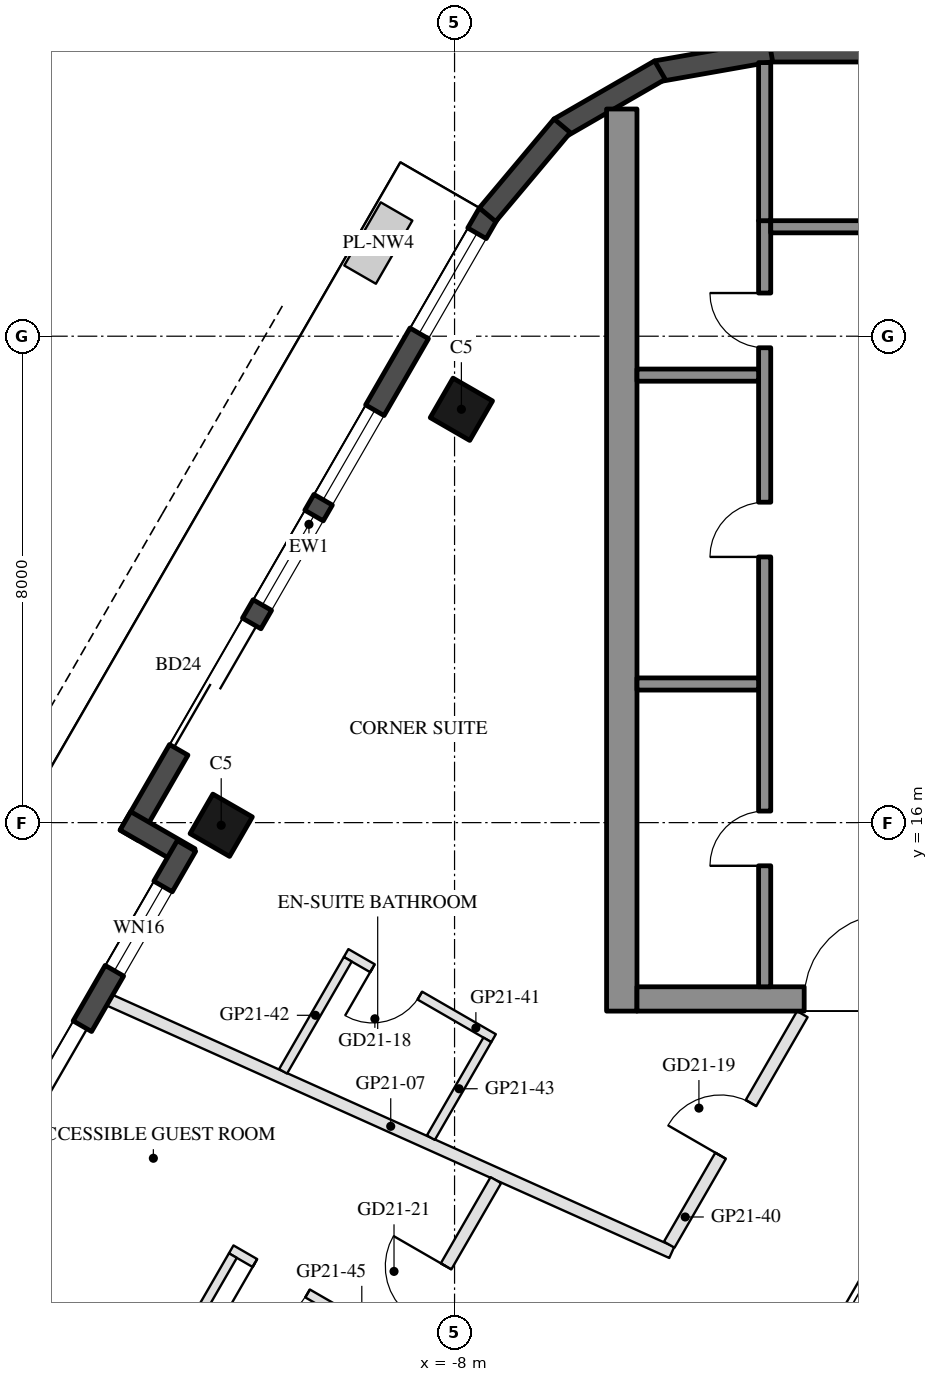
"""IFC4 building model, lengths in metres.
Left out: names, types, materials, properties, quantities, classifications, styles, units other than length and angle.
Written with IfcOpenShell. Run it as: python <this file> out.ifc"""

import sys

from ifc_helpers import new_model, si_unit, direction, frame, frame_2d, origin, origin_2d, place, context, subcontext, project, spatial, rectangle, hollow_rectangle, extrude, element, fill, save


model = new_model("IFC4")
c1 = context("Model", 3, precision=1e-05, world=origin(), true_north=direction((0.0, 1.0)))
c2 = subcontext(c1, "Body", "Model", "MODEL_VIEW")
j1 = project(units=[si_unit("LENGTHUNIT", "METRE"), si_unit("PLANEANGLEUNIT", "RADIAN")], contexts=[c1])
p1 = place(None, origin())
s1 = spatial("IfcSite", under=j1, at=p1, CompositionType="ELEMENT")
p2 = place(p1, origin())
s2 = spatial("IfcBuilding", under=s1, at=p2, CompositionType="ELEMENT")
p3 = place(p2, frame((0.0, 0.0, 216.9)))
s3 = spatial("IfcBuildingStorey", under=s2, at=p3, CompositionType="ELEMENT", Elevation=216.9)
for number, where, z_axis, x_axis in (
    (1, (-7.888, 22.798, 0.0), (0.0, 0.0, 1.0), (0.5, 0.866, 0.0)),
    (2, (-11.838, 15.957, 0.0), (0.0, 0.0, 1.0), (0.5, 0.866, 0.0)),
):
    element("IfcColumn", number, at=place(p3, frame(where, z_axis=z_axis, x_axis=x_axis)), inside=s3, PredefinedType="COLUMN", context=c2, shape_type="SweptSolid", body=[
        extrude(hollow_rectangle(XDim=0.75, YDim=0.75, WallThickness=0.035, at=origin_2d()), origin(), (0.0, 0.0, 1.0), 3.7),
    ])
p4 = place(p3, frame((-7.441, 26.022, 0.0), z_axis=(0.0, 0.0, 1.0), x_axis=(-0.499992533062, -0.86602971478, 0.0)))
e3 = element("IfcWall", 3, at=p4, inside=s3, PredefinedType="SOLIDWALL", context=c2, shape_type="SweptSolid", body=[
    extrude(rectangle(XDim=11.816, YDim=0.35, at=frame_2d((5.908, 0.0))), origin(), (0.0, 0.0, 1.0), 3.55),
])
p5 = place(p4, frame((0.381, 0.0, 0.3)))
e4 = element("IfcOpeningElement", 4, at=p5, cuts=e3, PredefinedType="OPENING", context=c2, shape_type="SweptSolid", body=[
    extrude(rectangle(XDim=1.9, YDim=2.65, at=frame_2d((0.95, 1.325))), frame((0.0, 0.185, 0.0), z_axis=(0.0, -1.0, 0.0), x_axis=(1.0, 0.0, 0.0)), (0.0, 0.0, 1.0), 0.37),
])
p6 = place(p4, frame((7.791, 0.0, 0.0)))
e5 = element("IfcOpeningElement", 5, at=p6, cuts=e3, PredefinedType="OPENING", context=c2, shape_type="SweptSolid", body=[
    extrude(rectangle(XDim=2.4, YDim=2.4, at=frame_2d((1.2, 1.2))), frame((0.0, 0.185, 0.0), z_axis=(0.0, -1.0, 0.0), x_axis=(1.0, 0.0, 0.0)), (0.0, 0.0, 1.0), 0.37),
])
p7 = place(p4, frame((3.741, 0.0, 0.3)))
e6 = element("IfcOpeningElement", 6, at=p7, cuts=e3, PredefinedType="OPENING", context=c2, shape_type="SweptSolid", body=[
    extrude(rectangle(XDim=1.7, YDim=2.65, at=frame_2d((0.85, 1.325))), frame((0.0, 0.185, 0.0), z_axis=(0.0, -1.0, 0.0), x_axis=(1.0, 0.0, 0.0)), (0.0, 0.0, 1.0), 0.37),
])
p8 = place(p4, frame((5.741, 0.0, 0.3)))
e7 = element("IfcOpeningElement", 7, at=p8, cuts=e3, PredefinedType="OPENING", context=c2, shape_type="SweptSolid", body=[
    extrude(rectangle(XDim=1.7, YDim=2.65, at=frame_2d((0.85, 1.325))), frame((0.0, 0.185, 0.0), z_axis=(0.0, -1.0, 0.0), x_axis=(1.0, 0.0, 0.0)), (0.0, 0.0, 1.0), 0.37),
])
p9 = place(p3, frame((-13.413, 16.029, 0.0), z_axis=(0.0, 0.0, 1.0), x_axis=(0.866005645448, -0.500034220881, 0.0)))
e8 = element("IfcWall", 8, at=p9, inside=s3, PredefinedType="SOLIDWALL", context=c2, shape_type="SweptSolid", body=[
    extrude(rectangle(XDim=1.22, YDim=0.35, at=frame_2d((0.61, 0.0))), origin(), (0.0, 0.0, 1.0), 3.55),
])
p10 = place(p3, frame((-12.409, 15.617, 0.0), z_axis=(0.0, 0.0, 1.0), x_axis=(-0.500003597184, -0.866023326939, 0.0)))
e9 = element("IfcWall", 9, at=p10, inside=s3, PredefinedType="SOLIDWALL", context=c2, shape_type="SweptSolid", body=[
    extrude(rectangle(XDim=6.74, YDim=0.35, at=frame_2d((3.37, 0.0))), origin(), (0.0, 0.0, 1.0), 3.55),
])
p11 = place(p10, frame((0.77, 0.0, 0.3)))
e10 = element("IfcOpeningElement", 10, at=p11, cuts=e9, PredefinedType="OPENING", context=c2, shape_type="SweptSolid", body=[
    extrude(rectangle(XDim=1.6, YDim=2.65, at=frame_2d((0.8, 1.325))), frame((0.0, 0.185, 0.0), z_axis=(0.0, -1.0, 0.0), x_axis=(1.0, 0.0, 0.0)), (0.0, 0.0, 1.0), 0.37),
])
p12 = place(p10, frame((3.424, 0.0, 0.0)))
e11 = element("IfcOpeningElement", 11, at=p12, cuts=e9, PredefinedType="OPENING", context=c2, shape_type="SweptSolid", body=[
    extrude(rectangle(XDim=2.4, YDim=2.4, at=frame_2d((1.2, 1.2))), frame((0.0, 0.185, 0.0), z_axis=(0.0, -1.0, 0.0), x_axis=(1.0, 0.0, 0.0)), (0.0, 0.0, 1.0), 0.37),
])
p13 = place(p3, frame((2.829, 28.685, 0.0), z_axis=(0.0, 0.0, 1.0), x_axis=(-1.0, 0.0, 0.0)))
e12 = element("IfcWall", 12, at=p13, inside=s3, PredefinedType="SOLIDWALL", context=c2, shape_type="SweptSolid", body=[
    extrude(rectangle(XDim=5.658, YDim=0.35, at=frame_2d((2.829, 0.0))), origin(), (0.0, 0.0, 1.0), 3.55),
])
for number, where, z_axis, x_axis in (
    (13, (-2.799, 28.688, 0.0), (0.0, 0.0, 1.0), (-0.985, -0.174, 0.0)),
    (14, (-4.623, 28.377, 0.0), (0.0, 0.0, 1.0), (-0.866, -0.5, 0.0)),
):
    element("IfcWall", number, at=place(p3, frame(where, z_axis=z_axis, x_axis=x_axis)), inside=s3, PredefinedType="SOLIDWALL", context=c2, shape_type="SweptSolid", body=[
        extrude(rectangle(XDim=1.91, YDim=0.35, at=frame_2d((0.955, 0.0))), origin(), (0.0, 0.0, 1.0), 3.55),
    ])
p14 = place(p3, frame((-6.23, 27.461, 0.0), z_axis=(0.0, 0.0, 1.0), x_axis=(-0.642808304945, -0.766027077259, 0.0)))
e15 = element("IfcWall", 15, at=p14, inside=s3, PredefinedType="SOLIDWALL", context=c2, shape_type="SweptSolid", body=[
    extrude(rectangle(XDim=1.91, YDim=0.35, at=frame_2d((0.955, 0.0))), origin(), (0.0, 0.0, 1.0), 3.55),
])
p15 = place(p3, frame((-5.25, 12.9, 0.0), z_axis=(0.0, 0.0, 1.0), x_axis=(0.0, 1.0, 0.0)))
e16 = element("IfcWall", 16, at=p15, inside=s3, PredefinedType="SHEAR", context=c2, shape_type="SweptSolid", body=[
    extrude(rectangle(XDim=14.837, YDim=0.5, at=frame_2d((7.418, 0.0))), origin(), (0.0, 0.0, 1.0), 3.5),
])
p16 = place(p3, frame((5.0, 13.1, 0.0), z_axis=(0.0, 0.0, 1.0), x_axis=(-1.0, 0.0, 0.0)))
e17 = element("IfcWall", 17, at=p16, inside=s3, PredefinedType="SHEAR", context=c2, shape_type="SweptSolid", body=[
    extrude(rectangle(XDim=10.0, YDim=0.4, at=frame_2d((5.0, 0.0))), origin(), (0.0, 0.0, 1.0), 3.5),
])
p17 = place(p16, frame((3.55, 0.0, 0.0)))
e18 = element("IfcOpeningElement", 18, at=p17, cuts=e17, PredefinedType="OPENING", context=c2, shape_type="SweptSolid", body=[
    extrude(rectangle(XDim=1.1, YDim=2.1, at=frame_2d((0.55, 1.05))), frame((0.0, 0.21, 0.0), z_axis=(0.0, -1.0, 0.0), x_axis=(1.0, 0.0, 0.0)), (0.0, 0.0, 1.0), 0.42),
])
p18 = place(p16, frame((5.85, 0.0, 0.0)))
e19 = element("IfcOpeningElement", 19, at=p18, cuts=e17, PredefinedType="OPENING", context=c2, shape_type="SweptSolid", body=[
    extrude(rectangle(XDim=1.4, YDim=2.1, at=frame_2d((0.7, 1.05))), frame((0.0, 0.21, 0.0), z_axis=(0.0, -1.0, 0.0), x_axis=(1.0, 0.0, 0.0)), (0.0, 0.0, 1.0), 0.42),
])
p19 = place(p3, frame((-2.9, 13.3, 0.0), z_axis=(0.0, 0.0, 1.0), x_axis=(0.0, 1.0, 0.0)))
e20 = element("IfcWall", 20, at=p19, inside=s3, PredefinedType="SHEAR", context=c2, shape_type="SweptSolid", body=[
    extrude(rectangle(XDim=12.6, YDim=0.2, at=frame_2d((6.3, 0.0))), origin(), (0.0, 0.0, 1.0), 3.5),
])
p20 = place(p19, frame((1.99, 0.0, 0.0)))
e21 = element("IfcOpeningElement", 21, at=p20, cuts=e20, PredefinedType="OPENING", context=c2, shape_type="SweptSolid", body=[
    extrude(rectangle(XDim=0.9, YDim=2.1, at=frame_2d((0.45, 1.05))), frame((0.0, 0.11, 0.0), z_axis=(0.0, -1.0, 0.0), x_axis=(1.0, 0.0, 0.0)), (0.0, 0.0, 1.0), 0.22),
])
p21 = place(p19, frame((7.07, 0.0, 0.0)))
e22 = element("IfcOpeningElement", 22, at=p21, cuts=e20, PredefinedType="OPENING", context=c2, shape_type="SweptSolid", body=[
    extrude(rectangle(XDim=0.9, YDim=2.1, at=frame_2d((0.45, 1.05))), frame((0.0, 0.11, 0.0), z_axis=(0.0, -1.0, 0.0), x_axis=(1.0, 0.0, 0.0)), (0.0, 0.0, 1.0), 0.22),
])
p22 = place(p19, frame((10.51, 0.0, 0.0)))
e23 = element("IfcOpeningElement", 23, at=p22, cuts=e20, PredefinedType="OPENING", context=c2, shape_type="SweptSolid", body=[
    extrude(rectangle(XDim=0.9, YDim=2.1, at=frame_2d((0.45, 1.05))), frame((0.0, 0.11, 0.0), z_axis=(0.0, -1.0, 0.0), x_axis=(1.0, 0.0, 0.0)), (0.0, 0.0, 1.0), 0.22),
])
p23 = place(p3, frame((-0.4, 25.8, 0.0), z_axis=(0.0, 0.0, 1.0), x_axis=(-1.0, 0.0, 0.0)))
e24 = element("IfcWall", 24, at=p23, inside=s3, PredefinedType="SHEAR", context=c2, shape_type="SweptSolid", body=[
    extrude(rectangle(XDim=2.4, YDim=0.2, at=frame_2d((1.2, 0.0))), origin(), (0.0, 0.0, 1.0), 3.5),
])
for number, where, z_axis, x_axis in (
    (25, (-3.0, 18.28, 0.0), (0.0, 0.0, 1.0), (-1.0, 0.0, 0.0)),
    (26, (-3.0, 23.36, 0.0), (0.0, 0.0, 1.0), (-1.0, 0.0, 0.0)),
):
    element("IfcWall", number, at=place(p3, frame(where, z_axis=z_axis, x_axis=x_axis)), inside=s3, PredefinedType="SHEAR", context=c2, shape_type="SweptSolid", body=[
        extrude(rectangle(XDim=2.0, YDim=0.2, at=frame_2d((1.0, 0.0))), origin(), (0.0, 0.0, 1.0), 3.5),
    ])
p24 = place(p3, frame((-2.9, 25.9, 0.0), z_axis=(0.0, 0.0, 1.0), x_axis=(0.0, 1.0, 0.0)))
e27 = element("IfcWall", 27, at=p24, inside=s3, PredefinedType="SHEAR", context=c2, shape_type="SweptSolid", body=[
    extrude(rectangle(XDim=2.6, YDim=0.2, at=frame_2d((1.3, 0.0))), origin(), (0.0, 0.0, 1.0), 3.5),
])
p25 = place(p3, frame((-13.672, 13.08, 0.0), z_axis=(0.0, 0.0, 1.0), x_axis=(0.912311972773, -0.409495866077, 0.0)))
e28 = element("IfcWall", 28, at=p25, inside=s3, PredefinedType="PARTITIONING", context=c2, shape_type="SweptSolid", body=[
    extrude(rectangle(XDim=10.132, YDim=0.2, at=frame_2d((5.066, 0.0))), origin(), (0.0, 0.0, 1.0), 3.06),
])
p26 = place(p3, frame((-17.347, 8.514, 0.0), z_axis=(0.0, 0.0, 1.0), x_axis=(0.879604495132, -0.475705720109, 0.0)))
e29 = element("IfcWall", 29, at=p26, inside=s3, PredefinedType="PARTITIONING", context=c2, shape_type="SweptSolid", body=[
    extrude(rectangle(XDim=7.983, YDim=0.2, at=frame_2d((3.992, 0.0))), origin(), (0.0, 0.0, 1.0), 3.06),
])
p27 = place(p3, frame((-4.469, 9.059, 0.0), z_axis=(0.0, 0.0, 1.0), x_axis=(0.499996027077, 0.86602769754, 0.0)))
e30 = element("IfcWall", 30, at=p27, inside=s3, PredefinedType="PARTITIONING", context=c2, shape_type="SweptSolid", body=[
    extrude(rectangle(XDim=4.377, YDim=0.2, at=frame_2d((2.189, 0.0))), origin(), (0.0, 0.0, 1.0), 2.95),
])
p28 = place(p27, frame((1.689, 0.0, 0.0)))
e31 = element("IfcOpeningElement", 31, at=p28, cuts=e30, PredefinedType="OPENING", context=c2, shape_type="SweptSolid", body=[
    extrude(rectangle(XDim=1.0, YDim=2.1, at=frame_2d((0.5, 1.05))), frame((0.0, 0.11, 0.0), z_axis=(0.0, -1.0, 0.0), x_axis=(1.0, 0.0, 0.0)), (0.0, 0.0, 1.0), 0.22),
])
p29 = place(p3, frame((-7.358, 12.455, 0.0), z_axis=(0.0, 0.0, 1.0), x_axis=(-0.866034573852, 0.49998411664, 0.0)))
e32 = element("IfcWall", 32, at=p29, inside=s3, PredefinedType="PARTITIONING", context=c2, shape_type="SweptSolid", body=[
    extrude(rectangle(XDim=2.8, YDim=0.15, at=frame_2d((1.4, 0.0))), origin(), (0.0, 0.0, 1.0), 3.55),
])
p30 = place(p29, frame((1.4, 0.0, 0.0)))
e33 = element("IfcOpeningElement", 33, at=p30, cuts=e32, PredefinedType="OPENING", context=c2, shape_type="SweptSolid", body=[
    extrude(rectangle(XDim=0.9, YDim=2.1, at=frame_2d((0.45, 1.05))), frame((0.0, 0.085, 0.0), z_axis=(0.0, -1.0, 0.0), x_axis=(1.0, 0.0, 0.0)), (0.0, 0.0, 1.0), 0.17),
])
p31 = place(p3, frame((-9.756, 13.752, 0.0), z_axis=(0.0, 0.0, 1.0), x_axis=(-0.50001378257, -0.866017446268, 0.0)))
e34 = element("IfcWall", 34, at=p31, inside=s3, PredefinedType="PARTITIONING", context=c2, shape_type="SweptSolid", body=[
    extrude(rectangle(XDim=2.128, YDim=0.15, at=frame_2d((1.064, 0.0))), origin(), (0.0, 0.0, 1.0), 3.55),
])
p32 = place(p3, frame((-7.461, 12.427, 0.0), z_axis=(0.0, 0.0, 1.0), x_axis=(-0.500025795397, -0.866010510293, 0.0)))
e35 = element("IfcWall", 35, at=p32, inside=s3, PredefinedType="PARTITIONING", context=c2, shape_type="SweptSolid", body=[
    extrude(rectangle(XDim=1.858, YDim=0.15, at=frame_2d((0.929, 0.0))), origin(), (0.0, 0.0, 1.0), 3.55),
])
p33 = place(p3, frame((-10.363, 4.851, 0.0), z_axis=(0.0, 0.0, 1.0), x_axis=(0.50000147882, 0.866024549986, 0.0)))
e36 = element("IfcWall", 36, at=p33, inside=s3, PredefinedType="PARTITIONING", context=c2, shape_type="SweptSolid", body=[
    extrude(rectangle(XDim=6.084, YDim=0.2, at=frame_2d((3.042, 0.0))), origin(), (0.0, 0.0, 1.0), 2.95),
])
p34 = place(p33, frame((3.447, 0.0, 0.0)))
e37 = element("IfcOpeningElement", 37, at=p34, cuts=e36, PredefinedType="OPENING", context=c2, shape_type="SweptSolid", body=[
    extrude(rectangle(XDim=1.0, YDim=2.1, at=frame_2d((0.5, 1.05))), frame((0.0, 0.11, 0.0), z_axis=(0.0, -1.0, 0.0), x_axis=(1.0, 0.0, 0.0)), (0.0, 0.0, 1.0), 0.22),
])
p35 = place(p3, frame((-8.989, 7.431, 0.0), z_axis=(0.0, 0.0, 1.0), x_axis=(-0.86600983753, 0.500026960575, 0.0)))
e38 = element("IfcWall", 38, at=p35, inside=s3, PredefinedType="PARTITIONING", context=c2, shape_type="SweptSolid", body=[
    extrude(rectangle(XDim=3.1, YDim=0.15, at=frame_2d((1.55, 0.0))), origin(), (0.0, 0.0, 1.0), 3.55),
])
p36 = place(p35, frame((1.65, 0.0, 0.0)))
e39 = element("IfcOpeningElement", 39, at=p36, cuts=e38, PredefinedType="OPENING", context=c2, shape_type="SweptSolid", body=[
    extrude(rectangle(XDim=1.0, YDim=2.1, at=frame_2d((0.5, 1.05))), frame((0.0, 0.085, 0.0), z_axis=(0.0, -1.0, 0.0), x_axis=(1.0, 0.0, 0.0)), (0.0, 0.0, 1.0), 0.17),
])
p37 = place(p3, frame((-11.646, 8.879, 0.0), z_axis=(0.0, 0.0, 1.0), x_axis=(-0.499996155683, -0.86602762329, 0.0)))
e40 = element("IfcWall", 40, at=p37, inside=s3, PredefinedType="PARTITIONING", context=c2, shape_type="SweptSolid", body=[
    extrude(rectangle(XDim=2.934, YDim=0.15, at=frame_2d((1.467, 0.0))), origin(), (0.0, 0.0, 1.0), 2.95),
])
p38 = place(p5, origin())
e41 = element("IfcWindow", 41, at=p38, inside=s3, PartitioningType="SINGLE_PANEL", PredefinedType="WINDOW", context=c2, shape_type="SweptSolid", body=[
    extrude(rectangle(XDim=1.9, YDim=2.65, at=frame_2d((0.95, 1.325))), frame((0.0, 0.03, 0.0), z_axis=(0.0, -1.0, 0.0), x_axis=(1.0, 0.0, 0.0)), (0.0, 0.0, 1.0), 0.06),
])
fill(e4, e41)
p39 = place(p6, frame((2.4, 0.0, 0.0), z_axis=(0.0, 0.0, 1.0), x_axis=(-1.0, 0.0, 0.0)))
e42 = element("IfcDoor", 42, at=p39, inside=s3, OperationType="SLIDING_TO_LEFT", PredefinedType="DOOR", context=c2, shape_type="SweptSolid", body=[
    extrude(rectangle(XDim=2.4, YDim=2.4, at=frame_2d((1.2, 1.2))), frame((0.0, 0.025, 0.0), z_axis=(0.0, -1.0, 0.0), x_axis=(1.0, 0.0, 0.0)), (0.0, 0.0, 1.0), 0.05),
])
fill(e5, e42)
p40 = place(p7, origin())
e43 = element("IfcWindow", 43, at=p40, inside=s3, PartitioningType="SINGLE_PANEL", PredefinedType="WINDOW", context=c2, shape_type="SweptSolid", body=[
    extrude(rectangle(XDim=1.7, YDim=2.65, at=frame_2d((0.85, 1.325))), frame((0.0, 0.03, 0.0), z_axis=(0.0, -1.0, 0.0), x_axis=(1.0, 0.0, 0.0)), (0.0, 0.0, 1.0), 0.06),
])
fill(e6, e43)
p41 = place(p8, origin())
e44 = element("IfcWindow", 44, at=p41, inside=s3, PartitioningType="SINGLE_PANEL", PredefinedType="WINDOW", context=c2, shape_type="SweptSolid", body=[
    extrude(rectangle(XDim=1.7, YDim=2.65, at=frame_2d((0.85, 1.325))), frame((0.0, 0.03, 0.0), z_axis=(0.0, -1.0, 0.0), x_axis=(1.0, 0.0, 0.0)), (0.0, 0.0, 1.0), 0.06),
])
fill(e7, e44)
p42 = place(p11, origin())
e45 = element("IfcWindow", 45, at=p42, inside=s3, PartitioningType="SINGLE_PANEL", PredefinedType="WINDOW", context=c2, shape_type="SweptSolid", body=[
    extrude(rectangle(XDim=1.6, YDim=2.65, at=frame_2d((0.8, 1.325))), frame((0.0, 0.03, 0.0), z_axis=(0.0, -1.0, 0.0), x_axis=(1.0, 0.0, 0.0)), (0.0, 0.0, 1.0), 0.06),
])
fill(e10, e45)
p43 = place(p12, frame((2.4, 0.0, 0.0), z_axis=(0.0, 0.0, 1.0), x_axis=(-1.0, 0.0, 0.0)))
e46 = element("IfcDoor", 46, at=p43, inside=s3, OperationType="SLIDING_TO_LEFT", PredefinedType="DOOR", context=c2, shape_type="SweptSolid", body=[
    extrude(rectangle(XDim=2.4, YDim=2.4, at=frame_2d((1.2, 1.2))), frame((0.0, 0.025, 0.0), z_axis=(0.0, -1.0, 0.0), x_axis=(1.0, 0.0, 0.0)), (0.0, 0.0, 1.0), 0.05),
])
fill(e11, e46)
p44 = place(p20, origin())
e47 = element("IfcDoor", 47, at=p44, inside=s3, OperationType="SINGLE_SWING_LEFT", PredefinedType="DOOR", context=c2, shape_type="SweptSolid", body=[
    extrude(rectangle(XDim=0.9, YDim=2.1, at=frame_2d((0.45, 1.05))), frame((0.0, 0.025, 0.0), z_axis=(0.0, -1.0, 0.0), x_axis=(1.0, 0.0, 0.0)), (0.0, 0.0, 1.0), 0.05),
])
fill(e21, e47)
p45 = place(p21, origin())
e48 = element("IfcDoor", 48, at=p45, inside=s3, OperationType="SINGLE_SWING_LEFT", PredefinedType="DOOR", context=c2, shape_type="SweptSolid", body=[
    extrude(rectangle(XDim=0.9, YDim=2.1, at=frame_2d((0.45, 1.05))), frame((0.0, 0.025, 0.0), z_axis=(0.0, -1.0, 0.0), x_axis=(1.0, 0.0, 0.0)), (0.0, 0.0, 1.0), 0.05),
])
fill(e22, e48)
p46 = place(p22, origin())
e49 = element("IfcDoor", 49, at=p46, inside=s3, OperationType="SINGLE_SWING_RIGHT", PredefinedType="DOOR", context=c2, shape_type="SweptSolid", body=[
    extrude(rectangle(XDim=0.9, YDim=2.1, at=frame_2d((0.45, 1.05))), frame((0.0, 0.025, 0.0), z_axis=(0.0, -1.0, 0.0), x_axis=(1.0, 0.0, 0.0)), (0.0, 0.0, 1.0), 0.05),
])
fill(e23, e49)
p47 = place(p18, frame((1.4, 0.0, 0.0), z_axis=(0.0, 0.0, 1.0), x_axis=(-1.0, 0.0, 0.0)))
e50 = element("IfcDoor", 50, at=p47, inside=s3, OperationType="DOUBLE_DOOR_SINGLE_SWING", PredefinedType="DOOR", context=c2, shape_type="SweptSolid", body=[
    extrude(rectangle(XDim=1.4, YDim=2.1, at=frame_2d((0.7, 1.05))), frame((0.0, 0.025, 0.0), z_axis=(0.0, -1.0, 0.0), x_axis=(1.0, 0.0, 0.0)), (0.0, 0.0, 1.0), 0.05),
])
fill(e19, e50)
p48 = place(p30, origin())
e51 = element("IfcDoor", 51, at=p48, inside=s3, OperationType="SINGLE_SWING_RIGHT", PredefinedType="DOOR", context=c2, shape_type="SweptSolid", body=[
    extrude(rectangle(XDim=0.9, YDim=2.1, at=frame_2d((0.45, 1.05))), frame((0.0, 0.025, 0.0), z_axis=(0.0, -1.0, 0.0), x_axis=(1.0, 0.0, 0.0)), (0.0, 0.0, 1.0), 0.05),
])
fill(e33, e51)
p49 = place(p28, origin())
e52 = element("IfcDoor", 52, at=p49, inside=s3, OperationType="SINGLE_SWING_LEFT", PredefinedType="DOOR", context=c2, shape_type="SweptSolid", body=[
    extrude(rectangle(XDim=1.0, YDim=2.1, at=frame_2d((0.5, 1.05))), frame((0.0, 0.025, 0.0), z_axis=(0.0, -1.0, 0.0), x_axis=(1.0, 0.0, 0.0)), (0.0, 0.0, 1.0), 0.05),
])
fill(e31, e52)
p50 = place(p36, origin())
e53 = element("IfcDoor", 53, at=p50, inside=s3, OperationType="SINGLE_SWING_RIGHT", PredefinedType="DOOR", context=c2, shape_type="SweptSolid", body=[
    extrude(rectangle(XDim=1.0, YDim=2.1, at=frame_2d((0.5, 1.05))), frame((0.0, 0.025, 0.0), z_axis=(0.0, -1.0, 0.0), x_axis=(1.0, 0.0, 0.0)), (0.0, 0.0, 1.0), 0.05),
])
fill(e39, e53)
p51 = place(p34, origin())
e54 = element("IfcDoor", 54, at=p51, inside=s3, OperationType="SINGLE_SWING_RIGHT", PredefinedType="DOOR", context=c2, shape_type="SweptSolid", body=[
    extrude(rectangle(XDim=1.0, YDim=2.1, at=frame_2d((0.5, 1.05))), frame((0.0, 0.025, 0.0), z_axis=(0.0, -1.0, 0.0), x_axis=(1.0, 0.0, 0.0)), (0.0, 0.0, 1.0), 0.05),
])
fill(e37, e54)
save(model, sys.argv[1])
